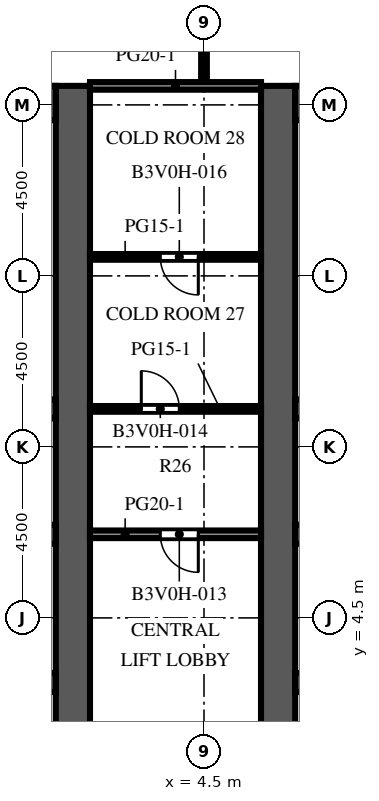
"""IFC4 building model, lengths in metres.
Left out: names, types, materials, properties, quantities, classifications, styles, units other than length and angle.
Written with IfcOpenShell. Run it as: python <this file> out.ifc"""

import sys

from ifc_helpers import new_model, si_unit, direction, frame, frame_2d, origin, place, context, subcontext, project, spatial, rectangle, extrude, element, fill, save


model = new_model("IFC4")
c1 = context("Model", 3, precision=1e-05, world=origin(), true_north=direction((0.0, 1.0)))
c2 = subcontext(c1, "Body", "Model", "MODEL_VIEW")
j1 = project(units=[si_unit("LENGTHUNIT", "METRE"), si_unit("PLANEANGLEUNIT", "RADIAN")], contexts=[c1])
p1 = place(None, origin())
s1 = spatial("IfcSite", under=j1, at=p1, CompositionType="ELEMENT")
p2 = place(p1, origin())
s2 = spatial("IfcBuilding", under=s1, at=p2, CompositionType="ELEMENT")
p3 = place(p2, frame((0.0, 0.0, 82.0)))
s3 = spatial("IfcBuildingStorey", under=s2, at=p3, CompositionType="ELEMENT", Elevation=82.0)
p4 = place(p3, frame((1.05, -9.0, 0.0), z_axis=(0.0, 0.0, 1.0), x_axis=(0.0, 1.0, 0.0)))
e1 = element("IfcWall", 1, at=p4, inside=s3, PredefinedType="SHEAR", context=c2, shape_type="SweptSolid", body=[
    extrude(rectangle(XDim=27.5, YDim=0.9, at=frame_2d((13.75, 0.0))), origin(), (0.0, 0.0, 1.0), 4.1),
])
p5 = place(p4, frame((12.55, 0.0, 0.0)))
e2 = element("IfcOpeningElement", 2, at=p5, cuts=e1, PredefinedType="OPENING", context=c2, shape_type="SweptSolid", body=[
    extrude(rectangle(XDim=2.4, YDim=2.4, at=frame_2d((1.2, 1.2))), frame((0.0, 0.46, 0.0), z_axis=(0.0, -1.0, 0.0), x_axis=(1.0, 0.0, 0.0)), (0.0, 0.0, 1.0), 0.92),
])
p6 = place(p4, frame((5.445, 0.0, 0.0)))
e3 = element("IfcOpeningElement", 3, at=p6, cuts=e1, PredefinedType="OPENING", context=c2, shape_type="SweptSolid", body=[
    extrude(rectangle(XDim=1.2, YDim=2.1, at=frame_2d((0.6, 1.05))), frame((0.0, 0.46, 0.0), z_axis=(0.0, -1.0, 0.0), x_axis=(1.0, 0.0, 0.0)), (0.0, 0.0, 1.0), 0.92),
])
p7 = place(p4, frame((19.485, 0.0, 0.0)))
e4 = element("IfcOpeningElement", 4, at=p7, cuts=e1, PredefinedType="OPENING", context=c2, shape_type="SweptSolid", body=[
    extrude(rectangle(XDim=1.0, YDim=2.1, at=frame_2d((0.5, 1.05))), frame((0.0, 0.46, 0.0), z_axis=(0.0, -1.0, 0.0), x_axis=(1.0, 0.0, 0.0)), (0.0, 0.0, 1.0), 0.92),
])
p8 = place(p4, frame((21.139, 0.0, 0.0)))
e5 = element("IfcOpeningElement", 5, at=p8, cuts=e1, PredefinedType="OPENING", context=c2, shape_type="SweptSolid", body=[
    extrude(rectangle(XDim=1.0, YDim=2.1, at=frame_2d((0.5, 1.05))), frame((0.0, 0.46, 0.0), z_axis=(0.0, -1.0, 0.0), x_axis=(1.0, 0.0, 0.0)), (0.0, 0.0, 1.0), 0.92),
])
p9 = place(p4, frame((23.16, 0.0, 0.0)))
e6 = element("IfcOpeningElement", 6, at=p9, cuts=e1, PredefinedType="OPENING", context=c2, shape_type="SweptSolid", body=[
    extrude(rectangle(XDim=1.0, YDim=2.1, at=frame_2d((0.5, 1.05))), frame((0.0, 0.46, 0.0), z_axis=(0.0, -1.0, 0.0), x_axis=(1.0, 0.0, 0.0)), (0.0, 0.0, 1.0), 0.92),
])
p10 = place(p4, frame((25.181, 0.0, 0.0)))
e7 = element("IfcOpeningElement", 7, at=p10, cuts=e1, PredefinedType="OPENING", context=c2, shape_type="SweptSolid", body=[
    extrude(rectangle(XDim=1.0, YDim=2.1, at=frame_2d((0.5, 1.05))), frame((0.0, 0.46, 0.0), z_axis=(0.0, -1.0, 0.0), x_axis=(1.0, 0.0, 0.0)), (0.0, 0.0, 1.0), 0.92),
])
p11 = place(p3, frame((-9.6, 18.05, 0.0), z_axis=(0.0, 0.0, 1.0), x_axis=(1.0, 0.0, 0.0)))
e8 = element("IfcWall", 8, at=p11, inside=s3, PredefinedType="SHEAR", context=c2, shape_type="SweptSolid", body=[
    extrude(rectangle(XDim=10.2, YDim=0.9, at=frame_2d((5.1, 0.0))), origin(), (0.0, 0.0, 1.0), 4.1),
])
p12 = place(p3, frame((-9.6, 2.8, 0.0), z_axis=(0.0, 0.0, 1.0), x_axis=(1.0, 0.0, 0.0)))
e9 = element("IfcWall", 9, at=p12, inside=s3, PredefinedType="SHEAR", context=c2, shape_type="SweptSolid", body=[
    extrude(rectangle(XDim=10.2, YDim=0.5, at=frame_2d((5.1, 0.0))), origin(), (0.0, 0.0, 1.0), 4.1),
])
p13 = place(p12, frame((0.562, 0.0, 0.0)))
e10 = element("IfcOpeningElement", 10, at=p13, cuts=e9, PredefinedType="OPENING", context=c2, shape_type="SweptSolid", body=[
    extrude(rectangle(XDim=1.1, YDim=2.1, at=frame_2d((0.55, 1.05))), frame((0.0, 0.26, 0.0), z_axis=(0.0, -1.0, 0.0), x_axis=(1.0, 0.0, 0.0)), (0.0, 0.0, 1.0), 0.52),
])
p14 = place(p12, frame((3.238, 0.0, 0.0)))
e11 = element("IfcOpeningElement", 11, at=p14, cuts=e9, PredefinedType="OPENING", context=c2, shape_type="SweptSolid", body=[
    extrude(rectangle(XDim=1.1, YDim=2.1, at=frame_2d((0.55, 1.05))), frame((0.0, 0.26, 0.0), z_axis=(0.0, -1.0, 0.0), x_axis=(1.0, 0.0, 0.0)), (0.0, 0.0, 1.0), 0.52),
])
p15 = place(p12, frame((8.538, 0.0, 0.0)))
e12 = element("IfcOpeningElement", 12, at=p15, cuts=e9, PredefinedType="OPENING", context=c2, shape_type="SweptSolid", body=[
    extrude(rectangle(XDim=1.1, YDim=2.1, at=frame_2d((0.55, 1.05))), frame((0.0, 0.26, 0.0), z_axis=(0.0, -1.0, 0.0), x_axis=(1.0, 0.0, 0.0)), (0.0, 0.0, 1.0), 0.52),
])
p16 = place(p3, frame((-9.6, 6.7, 0.0), z_axis=(0.0, 0.0, 1.0), x_axis=(1.0, 0.0, 0.0)))
e13 = element("IfcWall", 13, at=p16, inside=s3, PredefinedType="SHEAR", context=c2, shape_type="SweptSolid", body=[
    extrude(rectangle(XDim=10.2, YDim=0.5, at=frame_2d((5.1, 0.0))), origin(), (0.0, 0.0, 1.0), 4.1),
])
p17 = place(p16, frame((0.562, 0.0, 0.0)))
e14 = element("IfcOpeningElement", 14, at=p17, cuts=e13, PredefinedType="OPENING", context=c2, shape_type="SweptSolid", body=[
    extrude(rectangle(XDim=1.1, YDim=2.1, at=frame_2d((0.55, 1.05))), frame((0.0, 0.26, 0.0), z_axis=(0.0, -1.0, 0.0), x_axis=(1.0, 0.0, 0.0)), (0.0, 0.0, 1.0), 0.52),
])
p18 = place(p16, frame((3.288, 0.0, 0.0)))
e15 = element("IfcOpeningElement", 15, at=p18, cuts=e13, PredefinedType="OPENING", context=c2, shape_type="SweptSolid", body=[
    extrude(rectangle(XDim=1.0, YDim=2.1, at=frame_2d((0.5, 1.05))), frame((0.0, 0.26, 0.0), z_axis=(0.0, -1.0, 0.0), x_axis=(1.0, 0.0, 0.0)), (0.0, 0.0, 1.0), 0.52),
])
p19 = place(p16, frame((5.913, 0.0, 0.0)))
e16 = element("IfcOpeningElement", 16, at=p19, cuts=e13, PredefinedType="OPENING", context=c2, shape_type="SweptSolid", body=[
    extrude(rectangle(XDim=1.0, YDim=2.1, at=frame_2d((0.5, 1.05))), frame((0.0, 0.26, 0.0), z_axis=(0.0, -1.0, 0.0), x_axis=(1.0, 0.0, 0.0)), (0.0, 0.0, 1.0), 0.52),
])
p20 = place(p16, frame((8.587, 0.0, 0.0)))
e17 = element("IfcOpeningElement", 17, at=p20, cuts=e13, PredefinedType="OPENING", context=c2, shape_type="SweptSolid", body=[
    extrude(rectangle(XDim=1.0, YDim=2.1, at=frame_2d((0.5, 1.05))), frame((0.0, 0.26, 0.0), z_axis=(0.0, -1.0, 0.0), x_axis=(1.0, 0.0, 0.0)), (0.0, 0.0, 1.0), 0.52),
])
p21 = place(p3, frame((-9.6, 10.0, 0.0), z_axis=(0.0, 0.0, 1.0), x_axis=(1.0, 0.0, 0.0)))
e18 = element("IfcWall", 18, at=p21, inside=s3, PredefinedType="SHEAR", context=c2, shape_type="SweptSolid", body=[
    extrude(rectangle(XDim=10.2, YDim=0.5, at=frame_2d((5.1, 0.0))), origin(), (0.0, 0.0, 1.0), 4.1),
])
p22 = place(p3, frame((6.45, -9.0, 0.0), z_axis=(0.0, 0.0, 1.0), x_axis=(0.0, 1.0, 0.0)))
e19 = element("IfcWall", 19, at=p22, inside=s3, PredefinedType="SHEAR", context=c2, shape_type="SweptSolid", body=[
    extrude(rectangle(XDim=27.5, YDim=0.9, at=frame_2d((13.75, 0.0))), origin(), (0.0, 0.0, 1.0), 4.1),
])
p23 = place(p22, frame((12.55, 0.0, 0.0)))
e20 = element("IfcOpeningElement", 20, at=p23, cuts=e19, PredefinedType="OPENING", context=c2, shape_type="SweptSolid", body=[
    extrude(rectangle(XDim=2.4, YDim=2.4, at=frame_2d((1.2, 1.2))), frame((0.0, 0.46, 0.0), z_axis=(0.0, -1.0, 0.0), x_axis=(1.0, 0.0, 0.0)), (0.0, 0.0, 1.0), 0.92),
])
p24 = place(p22, frame((5.445, 0.0, 0.0)))
e21 = element("IfcOpeningElement", 21, at=p24, cuts=e19, PredefinedType="OPENING", context=c2, shape_type="SweptSolid", body=[
    extrude(rectangle(XDim=1.2, YDim=2.1, at=frame_2d((0.6, 1.05))), frame((0.0, 0.46, 0.0), z_axis=(0.0, -1.0, 0.0), x_axis=(1.0, 0.0, 0.0)), (0.0, 0.0, 1.0), 0.92),
])
p25 = place(p22, frame((19.485, 0.0, 0.0)))
e22 = element("IfcOpeningElement", 22, at=p25, cuts=e19, PredefinedType="OPENING", context=c2, shape_type="SweptSolid", body=[
    extrude(rectangle(XDim=1.0, YDim=2.1, at=frame_2d((0.5, 1.05))), frame((0.0, 0.46, 0.0), z_axis=(0.0, -1.0, 0.0), x_axis=(1.0, 0.0, 0.0)), (0.0, 0.0, 1.0), 0.92),
])
p26 = place(p22, frame((21.139, 0.0, 0.0)))
e23 = element("IfcOpeningElement", 23, at=p26, cuts=e19, PredefinedType="OPENING", context=c2, shape_type="SweptSolid", body=[
    extrude(rectangle(XDim=1.0, YDim=2.1, at=frame_2d((0.5, 1.05))), frame((0.0, 0.46, 0.0), z_axis=(0.0, -1.0, 0.0), x_axis=(1.0, 0.0, 0.0)), (0.0, 0.0, 1.0), 0.92),
])
p27 = place(p22, frame((23.16, 0.0, 0.0)))
e24 = element("IfcOpeningElement", 24, at=p27, cuts=e19, PredefinedType="OPENING", context=c2, shape_type="SweptSolid", body=[
    extrude(rectangle(XDim=1.0, YDim=2.1, at=frame_2d((0.5, 1.05))), frame((0.0, 0.46, 0.0), z_axis=(0.0, -1.0, 0.0), x_axis=(1.0, 0.0, 0.0)), (0.0, 0.0, 1.0), 0.92),
])
p28 = place(p22, frame((25.181, 0.0, 0.0)))
e25 = element("IfcOpeningElement", 25, at=p28, cuts=e19, PredefinedType="OPENING", context=c2, shape_type="SweptSolid", body=[
    extrude(rectangle(XDim=1.0, YDim=2.1, at=frame_2d((0.5, 1.05))), frame((0.0, 0.46, 0.0), z_axis=(0.0, -1.0, 0.0), x_axis=(1.0, 0.0, 0.0)), (0.0, 0.0, 1.0), 0.92),
])
p29 = place(p3, frame((6.9, 18.05, 0.0), z_axis=(0.0, 0.0, 1.0), x_axis=(1.0, 0.0, 0.0)))
e26 = element("IfcWall", 26, at=p29, inside=s3, PredefinedType="SHEAR", context=c2, shape_type="SweptSolid", body=[
    extrude(rectangle(XDim=10.2, YDim=0.9, at=frame_2d((5.1, 0.0))), origin(), (0.0, 0.0, 1.0), 4.1),
])
p30 = place(p3, frame((6.9, 2.8, 0.0), z_axis=(0.0, 0.0, 1.0), x_axis=(1.0, 0.0, 0.0)))
e27 = element("IfcWall", 27, at=p30, inside=s3, PredefinedType="SHEAR", context=c2, shape_type="SweptSolid", body=[
    extrude(rectangle(XDim=10.2, YDim=0.5, at=frame_2d((5.1, 0.0))), origin(), (0.0, 0.0, 1.0), 4.1),
])
p31 = place(p30, frame((0.562, 0.0, 0.0)))
e28 = element("IfcOpeningElement", 28, at=p31, cuts=e27, PredefinedType="OPENING", context=c2, shape_type="SweptSolid", body=[
    extrude(rectangle(XDim=1.1, YDim=2.1, at=frame_2d((0.55, 1.05))), frame((0.0, 0.26, 0.0), z_axis=(0.0, -1.0, 0.0), x_axis=(1.0, 0.0, 0.0)), (0.0, 0.0, 1.0), 0.52),
])
p32 = place(p30, frame((3.238, 0.0, 0.0)))
e29 = element("IfcOpeningElement", 29, at=p32, cuts=e27, PredefinedType="OPENING", context=c2, shape_type="SweptSolid", body=[
    extrude(rectangle(XDim=1.1, YDim=2.1, at=frame_2d((0.55, 1.05))), frame((0.0, 0.26, 0.0), z_axis=(0.0, -1.0, 0.0), x_axis=(1.0, 0.0, 0.0)), (0.0, 0.0, 1.0), 0.52),
])
p33 = place(p30, frame((8.538, 0.0, 0.0)))
e30 = element("IfcOpeningElement", 30, at=p33, cuts=e27, PredefinedType="OPENING", context=c2, shape_type="SweptSolid", body=[
    extrude(rectangle(XDim=1.1, YDim=2.1, at=frame_2d((0.55, 1.05))), frame((0.0, 0.26, 0.0), z_axis=(0.0, -1.0, 0.0), x_axis=(1.0, 0.0, 0.0)), (0.0, 0.0, 1.0), 0.52),
])
p34 = place(p3, frame((6.9, 6.7, 0.0), z_axis=(0.0, 0.0, 1.0), x_axis=(1.0, 0.0, 0.0)))
e31 = element("IfcWall", 31, at=p34, inside=s3, PredefinedType="SHEAR", context=c2, shape_type="SweptSolid", body=[
    extrude(rectangle(XDim=10.2, YDim=0.5, at=frame_2d((5.1, 0.0))), origin(), (0.0, 0.0, 1.0), 4.1),
])
p35 = place(p34, frame((0.562, 0.0, 0.0)))
e32 = element("IfcOpeningElement", 32, at=p35, cuts=e31, PredefinedType="OPENING", context=c2, shape_type="SweptSolid", body=[
    extrude(rectangle(XDim=1.1, YDim=2.1, at=frame_2d((0.55, 1.05))), frame((0.0, 0.26, 0.0), z_axis=(0.0, -1.0, 0.0), x_axis=(1.0, 0.0, 0.0)), (0.0, 0.0, 1.0), 0.52),
])
p36 = place(p34, frame((3.288, 0.0, 0.0)))
e33 = element("IfcOpeningElement", 33, at=p36, cuts=e31, PredefinedType="OPENING", context=c2, shape_type="SweptSolid", body=[
    extrude(rectangle(XDim=1.0, YDim=2.1, at=frame_2d((0.5, 1.05))), frame((0.0, 0.26, 0.0), z_axis=(0.0, -1.0, 0.0), x_axis=(1.0, 0.0, 0.0)), (0.0, 0.0, 1.0), 0.52),
])
p37 = place(p34, frame((5.913, 0.0, 0.0)))
e34 = element("IfcOpeningElement", 34, at=p37, cuts=e31, PredefinedType="OPENING", context=c2, shape_type="SweptSolid", body=[
    extrude(rectangle(XDim=1.0, YDim=2.1, at=frame_2d((0.5, 1.05))), frame((0.0, 0.26, 0.0), z_axis=(0.0, -1.0, 0.0), x_axis=(1.0, 0.0, 0.0)), (0.0, 0.0, 1.0), 0.52),
])
p38 = place(p34, frame((8.587, 0.0, 0.0)))
e35 = element("IfcOpeningElement", 35, at=p38, cuts=e31, PredefinedType="OPENING", context=c2, shape_type="SweptSolid", body=[
    extrude(rectangle(XDim=1.0, YDim=2.1, at=frame_2d((0.5, 1.05))), frame((0.0, 0.26, 0.0), z_axis=(0.0, -1.0, 0.0), x_axis=(1.0, 0.0, 0.0)), (0.0, 0.0, 1.0), 0.52),
])
p39 = place(p3, frame((6.9, 10.0, 0.0), z_axis=(0.0, 0.0, 1.0), x_axis=(1.0, 0.0, 0.0)))
e36 = element("IfcWall", 36, at=p39, inside=s3, PredefinedType="SHEAR", context=c2, shape_type="SweptSolid", body=[
    extrude(rectangle(XDim=10.2, YDim=0.5, at=frame_2d((5.1, 0.0))), origin(), (0.0, 0.0, 1.0), 4.1),
])
for number, where, z_axis, x_axis in (
    (37, (-4.25, 11.72, 0.0), (0.0, 0.0, 1.0), (1.0, 0.0, 0.0)),
    (38, (-4.25, 13.558, 0.0), (0.0, 0.0, 1.0), (1.0, 0.0, 0.0)),
    (39, (-4.25, 15.762, 0.0), (0.0, 0.0, 1.0), (1.0, 0.0, 0.0)),
    (40, (6.9, 11.72, 0.0), (0.0, 0.0, 1.0), (1.0, 0.0, 0.0)),
    (41, (6.9, 13.558, 0.0), (0.0, 0.0, 1.0), (1.0, 0.0, 0.0)),
    (42, (6.9, 15.762, 0.0), (0.0, 0.0, 1.0), (1.0, 0.0, 0.0)),
):
    element("IfcWall", number, at=place(p3, frame(where, z_axis=z_axis, x_axis=x_axis)), inside=s3, PredefinedType="PARTITIONING", context=c2, shape_type="SweptSolid", body=[
        extrude(rectangle(XDim=4.85, YDim=0.1, at=frame_2d((2.425, 0.0))), origin(), (0.0, 0.0, 1.0), 3.65),
    ])
p40 = place(p3, frame((4.5, 26.4, 0.0), z_axis=(0.0, 0.0, 1.0), x_axis=(0.0, -1.0, 0.0)))
e43 = element("IfcWall", 43, at=p40, inside=s3, PredefinedType="PARTITIONING", context=c2, shape_type="SweptSolid", body=[
    extrude(rectangle(XDim=7.9, YDim=0.15, at=frame_2d((3.95, 0.0))), origin(), (0.0, 0.0, 1.0), 3.65),
])
p41 = place(p40, frame((3.3, 0.0, 0.0)))
e44 = element("IfcOpeningElement", 44, at=p41, cuts=e43, PredefinedType="OPENING", context=c2, shape_type="SweptSolid", body=[
    extrude(rectangle(XDim=1.0, YDim=2.1, at=frame_2d((0.5, 1.05))), frame((0.0, 0.085, 0.0), z_axis=(0.0, -1.0, 0.0), x_axis=(1.0, 0.0, 0.0)), (0.0, 0.0, 1.0), 0.17),
])
p42 = place(p3, frame((1.5, 6.7, 0.0), z_axis=(0.0, 0.0, 1.0), x_axis=(1.0, 0.0, 0.0)))
e45 = element("IfcWall", 45, at=p42, inside=s3, PredefinedType="PARTITIONING", context=c2, shape_type="SweptSolid", body=[
    extrude(rectangle(XDim=4.5, YDim=0.2, at=frame_2d((2.25, 0.0))), origin(), (0.0, 0.0, 1.0), 3.65),
])
p43 = place(p42, frame((1.85, 0.0, 0.0)))
e46 = element("IfcOpeningElement", 46, at=p43, cuts=e45, PredefinedType="OPENING", context=c2, shape_type="SweptSolid", body=[
    extrude(rectangle(XDim=1.0, YDim=2.1, at=frame_2d((0.5, 1.05))), frame((0.0, 0.11, 0.0), z_axis=(0.0, -1.0, 0.0), x_axis=(1.0, 0.0, 0.0)), (0.0, 0.0, 1.0), 0.22),
])
p44 = place(p3, frame((1.5, 10.0, 0.0), z_axis=(0.0, 0.0, 1.0), x_axis=(1.0, 0.0, 0.0)))
e47 = element("IfcWall", 47, at=p44, inside=s3, PredefinedType="PARTITIONING", context=c2, shape_type="SweptSolid", body=[
    extrude(rectangle(XDim=4.5, YDim=0.15, at=frame_2d((2.25, 0.0))), origin(), (0.0, 0.0, 1.0), 3.65),
])
p45 = place(p44, frame((1.35, 0.0, 0.0)))
e48 = element("IfcOpeningElement", 48, at=p45, cuts=e47, PredefinedType="OPENING", context=c2, shape_type="SweptSolid", body=[
    extrude(rectangle(XDim=1.0, YDim=2.1, at=frame_2d((0.5, 1.05))), frame((0.0, 0.085, 0.0), z_axis=(0.0, -1.0, 0.0), x_axis=(1.0, 0.0, 0.0)), (0.0, 0.0, 1.0), 0.17),
])
p46 = place(p3, frame((1.5, 14.0, 0.0), z_axis=(0.0, 0.0, 1.0), x_axis=(1.0, 0.0, 0.0)))
e49 = element("IfcWall", 49, at=p46, inside=s3, PredefinedType="PARTITIONING", context=c2, shape_type="SweptSolid", body=[
    extrude(rectangle(XDim=4.5, YDim=0.15, at=frame_2d((2.25, 0.0))), origin(), (0.0, 0.0, 1.0), 3.65),
])
p47 = place(p46, frame((1.85, 0.0, 0.0)))
e50 = element("IfcOpeningElement", 50, at=p47, cuts=e49, PredefinedType="OPENING", context=c2, shape_type="SweptSolid", body=[
    extrude(rectangle(XDim=1.0, YDim=2.1, at=frame_2d((0.5, 1.05))), frame((0.0, 0.085, 0.0), z_axis=(0.0, -1.0, 0.0), x_axis=(1.0, 0.0, 0.0)), (0.0, 0.0, 1.0), 0.17),
])
p48 = place(p3, frame((1.5, 18.5, 0.0), z_axis=(0.0, 0.0, 1.0), x_axis=(1.0, 0.0, 0.0)))
e51 = element("IfcWall", 51, at=p48, inside=s3, PredefinedType="PARTITIONING", context=c2, shape_type="SweptSolid", body=[
    extrude(rectangle(XDim=4.5, YDim=0.2, at=frame_2d((2.25, 0.0))), origin(), (0.0, 0.0, 1.0), 3.65),
])
p49 = place(p5, origin())
e52 = element("IfcDoor", 52, at=p49, inside=s3, OperationType="DOUBLE_DOOR_DOUBLE_SWING", PredefinedType="DOOR", context=c2, shape_type="SweptSolid", body=[
    extrude(rectangle(XDim=2.4, YDim=2.4, at=frame_2d((1.2, 1.2))), frame((0.0, 0.025, 0.0), z_axis=(0.0, -1.0, 0.0), x_axis=(1.0, 0.0, 0.0)), (0.0, 0.0, 1.0), 0.05),
])
fill(e2, e52)
p50 = place(p23, origin())
e53 = element("IfcDoor", 53, at=p50, inside=s3, OperationType="DOUBLE_DOOR_DOUBLE_SWING", PredefinedType="DOOR", context=c2, shape_type="SweptSolid", body=[
    extrude(rectangle(XDim=2.4, YDim=2.4, at=frame_2d((1.2, 1.2))), frame((0.0, 0.025, 0.0), z_axis=(0.0, -1.0, 0.0), x_axis=(1.0, 0.0, 0.0)), (0.0, 0.0, 1.0), 0.05),
])
fill(e20, e53)
p51 = place(p7, origin())
e54 = element("IfcDoor", 54, at=p51, inside=s3, OperationType="SINGLE_SWING_LEFT", PredefinedType="DOOR", context=c2, shape_type="SweptSolid", body=[
    extrude(rectangle(XDim=1.0, YDim=2.1, at=frame_2d((0.5, 1.05))), frame((0.0, 0.425, 0.0), z_axis=(0.0, -1.0, 0.0), x_axis=(1.0, 0.0, 0.0)), (0.0, 0.0, 1.0), 0.05),
])
fill(e4, e54)
p52 = place(p8, origin())
e55 = element("IfcDoor", 55, at=p52, inside=s3, OperationType="SINGLE_SWING_RIGHT", PredefinedType="DOOR", context=c2, shape_type="SweptSolid", body=[
    extrude(rectangle(XDim=1.0, YDim=2.1, at=frame_2d((0.5, 1.05))), frame((0.0, 0.425, 0.0), z_axis=(0.0, -1.0, 0.0), x_axis=(1.0, 0.0, 0.0)), (0.0, 0.0, 1.0), 0.05),
])
fill(e5, e55)
p53 = place(p9, origin())
e56 = element("IfcDoor", 56, at=p53, inside=s3, OperationType="SINGLE_SWING_LEFT", PredefinedType="DOOR", context=c2, shape_type="SweptSolid", body=[
    extrude(rectangle(XDim=1.0, YDim=2.1, at=frame_2d((0.5, 1.05))), frame((0.0, 0.425, 0.0), z_axis=(0.0, -1.0, 0.0), x_axis=(1.0, 0.0, 0.0)), (0.0, 0.0, 1.0), 0.05),
])
fill(e6, e56)
p54 = place(p10, origin())
e57 = element("IfcDoor", 57, at=p54, inside=s3, OperationType="SINGLE_SWING_RIGHT", PredefinedType="DOOR", context=c2, shape_type="SweptSolid", body=[
    extrude(rectangle(XDim=1.0, YDim=2.1, at=frame_2d((0.5, 1.05))), frame((0.0, 0.425, 0.0), z_axis=(0.0, -1.0, 0.0), x_axis=(1.0, 0.0, 0.0)), (0.0, 0.0, 1.0), 0.05),
])
fill(e7, e57)
p55 = place(p25, origin())
e58 = element("IfcDoor", 58, at=p55, inside=s3, OperationType="SINGLE_SWING_RIGHT", PredefinedType="DOOR", context=c2, shape_type="SweptSolid", body=[
    extrude(rectangle(XDim=1.0, YDim=2.1, at=frame_2d((0.5, 1.05))), frame((0.0, -0.375, 0.0), z_axis=(0.0, -1.0, 0.0), x_axis=(1.0, 0.0, 0.0)), (0.0, 0.0, 1.0), 0.05),
])
fill(e22, e58)
p56 = place(p26, origin())
e59 = element("IfcDoor", 59, at=p56, inside=s3, OperationType="SINGLE_SWING_LEFT", PredefinedType="DOOR", context=c2, shape_type="SweptSolid", body=[
    extrude(rectangle(XDim=1.0, YDim=2.1, at=frame_2d((0.5, 1.05))), frame((0.0, -0.375, 0.0), z_axis=(0.0, -1.0, 0.0), x_axis=(1.0, 0.0, 0.0)), (0.0, 0.0, 1.0), 0.05),
])
fill(e23, e59)
p57 = place(p27, origin())
e60 = element("IfcDoor", 60, at=p57, inside=s3, OperationType="SINGLE_SWING_RIGHT", PredefinedType="DOOR", context=c2, shape_type="SweptSolid", body=[
    extrude(rectangle(XDim=1.0, YDim=2.1, at=frame_2d((0.5, 1.05))), frame((0.0, -0.375, 0.0), z_axis=(0.0, -1.0, 0.0), x_axis=(1.0, 0.0, 0.0)), (0.0, 0.0, 1.0), 0.05),
])
fill(e24, e60)
p58 = place(p28, origin())
e61 = element("IfcDoor", 61, at=p58, inside=s3, OperationType="SINGLE_SWING_LEFT", PredefinedType="DOOR", context=c2, shape_type="SweptSolid", body=[
    extrude(rectangle(XDim=1.0, YDim=2.1, at=frame_2d((0.5, 1.05))), frame((0.0, -0.375, 0.0), z_axis=(0.0, -1.0, 0.0), x_axis=(1.0, 0.0, 0.0)), (0.0, 0.0, 1.0), 0.05),
])
fill(e25, e61)
p59 = place(p43, origin())
e62 = element("IfcDoor", 62, at=p59, inside=s3, OperationType="SINGLE_SWING_RIGHT", PredefinedType="DOOR", context=c2, shape_type="SweptSolid", body=[
    extrude(rectangle(XDim=1.0, YDim=2.1, at=frame_2d((0.5, 1.05))), frame((0.0, 0.025, 0.0), z_axis=(0.0, -1.0, 0.0), x_axis=(1.0, 0.0, 0.0)), (0.0, 0.0, 1.0), 0.05),
])
fill(e46, e62)
p60 = place(p45, origin())
e63 = element("IfcDoor", 63, at=p60, inside=s3, OperationType="SINGLE_SWING_LEFT", PredefinedType="DOOR", context=c2, shape_type="SweptSolid", body=[
    extrude(rectangle(XDim=1.0, YDim=2.1, at=frame_2d((0.5, 1.05))), frame((0.0, 0.025, 0.0), z_axis=(0.0, -1.0, 0.0), x_axis=(1.0, 0.0, 0.0)), (0.0, 0.0, 1.0), 0.05),
])
fill(e48, e63)
p61 = place(p47, origin())
e64 = element("IfcDoor", 64, at=p61, inside=s3, OperationType="SINGLE_SWING_RIGHT", PredefinedType="DOOR", context=c2, shape_type="SweptSolid", body=[
    extrude(rectangle(XDim=1.0, YDim=2.1, at=frame_2d((0.5, 1.05))), frame((0.0, 0.025, 0.0), z_axis=(0.0, -1.0, 0.0), x_axis=(1.0, 0.0, 0.0)), (0.0, 0.0, 1.0), 0.05),
])
fill(e50, e64)
save(model, sys.argv[1])
